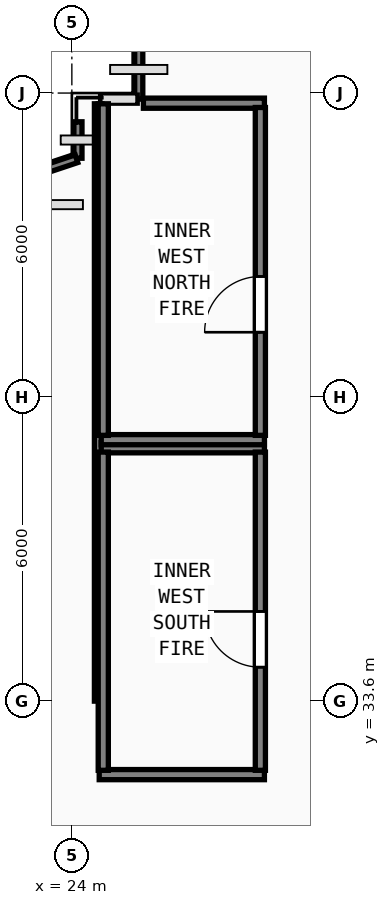
"""IFC4 building model, lengths in metres.
Left out: names, types, materials, properties, quantities, classifications, styles, units other than length and angle.
Written with IfcOpenShell. Run it as: python <this file> out.ifc"""

import sys

from ifc_helpers import new_model, si_unit, direction, frame, frame_2d, origin, origin_2d, place, context, subcontext, project, spatial, rectangle, hollow_rectangle, extrude, element, fill, save


model = new_model("IFC4")
c1 = context("Model", 3, precision=1e-05, world=origin(), true_north=direction((0.0, 1.0)))
c2 = subcontext(c1, "Body", "Model", "MODEL_VIEW")
j1 = project(units=[si_unit("LENGTHUNIT", "METRE"), si_unit("PLANEANGLEUNIT", "RADIAN")], contexts=[c1])
p1 = place(None, origin())
s1 = spatial("IfcSite", under=j1, at=p1, CompositionType="ELEMENT")
p2 = place(p1, origin())
s2 = spatial("IfcBuilding", under=s1, at=p2, CompositionType="ELEMENT")
p3 = place(p2, frame((0.0, 0.0, 89.4)))
s3 = spatial("IfcBuildingStorey", under=s2, at=p3, CompositionType="ELEMENT", Elevation=89.4)
for number, where, z_axis, x_axis in (
    (1, (24.0, 33.6, 0.0), (0.0, 0.0, 1.0), (1.0, 0.0, 0.0)),
    (2, (24.0, 45.6, 0.0), (0.0, 0.0, 1.0), (1.0, 0.0, 0.0)),
):
    element("IfcColumn", number, at=place(p3, frame(where, z_axis=z_axis, x_axis=x_axis)), inside=s3, PredefinedType="COLUMN", context=c2, shape_type="SweptSolid", body=[
        extrude(hollow_rectangle(XDim=1.15, YDim=1.15, WallThickness=0.042, at=origin_2d()), origin(), (0.0, 0.0, 1.0), 4.6),
    ])
p4 = place(p3, frame((24.0, 39.6, 0.0), z_axis=(0.0, 0.0, 1.0), x_axis=(1.0, 0.0, 0.0)))
e3 = element("IfcColumn", 3, at=p4, inside=s3, PredefinedType="COLUMN", context=c2, shape_type="SweptSolid", body=[
    extrude(hollow_rectangle(XDim=1.0, YDim=1.0, WallThickness=0.038, at=origin_2d()), origin(), (0.0, 0.0, 1.0), 4.6),
])
p5 = place(p3, frame((25.32, 46.65, 0.0), z_axis=(0.0, 0.0, 1.0), x_axis=(0.0, -1.0, 0.0)))
e4 = element("IfcWall", 4, at=p5, inside=s3, PredefinedType="PARAPET", context=c2, shape_type="SweptSolid", body=[
    extrude(rectangle(XDim=1.17, YDim=0.16, at=frame_2d((0.585, 0.0))), origin(), (0.0, 0.0, 1.0), 1.15),
])
p6 = place(p3, frame((25.29, 45.48, 0.0), z_axis=(0.0, 0.0, 1.0), x_axis=(-1.0, 0.0, 0.0)))
e5 = element("IfcWall", 5, at=p6, inside=s3, PredefinedType="PARAPET", context=c2, shape_type="SweptSolid", body=[
    extrude(rectangle(XDim=0.723, YDim=0.16, at=frame_2d((0.362, 0.0))), origin(), (0.0, 0.0, 1.0), 1.15),
])
p7 = place(p3, frame((24.12, 45.033, 0.0), z_axis=(0.0, 0.0, 1.0), x_axis=(0.0, -1.0, 0.0)))
e6 = element("IfcWall", 6, at=p7, inside=s3, PredefinedType="PARAPET", context=c2, shape_type="SweptSolid", body=[
    extrude(rectangle(XDim=0.719, YDim=0.16, at=frame_2d((0.36, 0.0))), origin(), (0.0, 0.0, 1.0), 1.15),
])
p8 = place(p3, frame((24.092, 44.304, 0.0), z_axis=(0.0, 0.0, 1.0), x_axis=(-0.948683298051, -0.316227766017, 0.0)))
e7 = element("IfcWall", 7, at=p8, inside=s3, PredefinedType="PARAPET", context=c2, shape_type="SweptSolid", body=[
    extrude(rectangle(XDim=5.73, YDim=0.16, at=frame_2d((2.865, 0.0))), origin(), (0.0, 0.0, 1.0), 1.15),
])
p9 = place(p3, frame((24.52, 33.6, 0.0), z_axis=(0.0, 0.0, 1.0), x_axis=(0.0, 1.0, 0.0)))
e8 = element("IfcWall", 8, at=p9, inside=s3, PredefinedType="PARTITIONING", context=c2, shape_type="SweptSolid", body=[
    extrude(rectangle(XDim=11.788, YDim=0.15, at=frame_2d((5.894, 0.0))), origin(), (0.0, 0.0, 1.0), 4.35),
])
p10 = place(p3, frame((24.58, 38.6, 0.0), z_axis=(0.0, 0.0, 1.0), x_axis=(1.0, 0.0, 0.0)))
e9 = element("IfcWall", 9, at=p10, inside=s3, PredefinedType="SOLIDWALL", context=c2, shape_type="SweptSolid", body=[
    extrude(rectangle(XDim=3.22, YDim=0.2, at=frame_2d((1.61, 0.0))), origin(), (0.0, 0.0, 1.0), 4.35),
])
p11 = place(p3, frame((24.54, 32.15, 0.0), z_axis=(0.0, 0.0, 1.0), x_axis=(1.0, 0.0, 0.0)))
e10 = element("IfcWall", 10, at=p11, inside=s3, PredefinedType="SOLIDWALL", context=c2, shape_type="SweptSolid", body=[
    extrude(rectangle(XDim=3.26, YDim=0.2, at=frame_2d((1.63, 0.0))), origin(), (0.0, 0.0, 1.0), 4.35),
])
p12 = place(p3, frame((24.62, 32.235, 0.0), z_axis=(0.0, 0.0, 1.0), x_axis=(0.0, 1.0, 0.0)))
e11 = element("IfcWall", 11, at=p12, inside=s3, PredefinedType="SOLIDWALL", context=c2, shape_type="SweptSolid", body=[
    extrude(rectangle(XDim=6.28, YDim=0.2, at=frame_2d((3.14, 0.0))), origin(), (0.0, 0.0, 1.0), 4.35),
])
p13 = place(p3, frame((27.72, 32.235, 0.0), z_axis=(0.0, 0.0, 1.0), x_axis=(0.0, 1.0, 0.0)))
e12 = element("IfcWall", 12, at=p13, inside=s3, PredefinedType="SOLIDWALL", context=c2, shape_type="SweptSolid", body=[
    extrude(rectangle(XDim=6.28, YDim=0.2, at=frame_2d((3.14, 0.0))), origin(), (0.0, 0.0, 1.0), 4.35),
])
p14 = place(p13, frame((3.135, 0.0, 0.0), z_axis=(0.0, 0.0, 1.0), x_axis=(-1.0, 0.0, 0.0)))
e13 = element("IfcOpeningElement", 13, at=p14, cuts=e12, PredefinedType="OPENING", context=c2, shape_type="SweptSolid", body=[
    extrude(rectangle(XDim=1.1, YDim=2.15, at=frame_2d((0.55, 1.075))), frame((0.0, 0.11, 0.0), z_axis=(0.0, -1.0, 0.0), x_axis=(1.0, 0.0, 0.0)), (0.0, 0.0, 1.0), 0.22),
])
p15 = place(p3, frame((25.412, 45.4, 0.0), z_axis=(0.0, 0.0, 1.0), x_axis=(1.0, 0.0, 0.0)))
e14 = element("IfcWall", 14, at=p15, inside=s3, PredefinedType="SOLIDWALL", context=c2, shape_type="SweptSolid", body=[
    extrude(rectangle(XDim=2.388, YDim=0.2, at=frame_2d((1.194, 0.0))), origin(), (0.0, 0.0, 1.0), 4.35),
])
p16 = place(p3, frame((24.58, 38.76, 0.0), z_axis=(0.0, 0.0, 1.0), x_axis=(1.0, 0.0, 0.0)))
e15 = element("IfcWall", 15, at=p16, inside=s3, PredefinedType="SOLIDWALL", context=c2, shape_type="SweptSolid", body=[
    extrude(rectangle(XDim=3.22, YDim=0.2, at=frame_2d((1.61, 0.0))), origin(), (0.0, 0.0, 1.0), 4.35),
])
p17 = place(p3, frame((24.62, 38.845, 0.0), z_axis=(0.0, 0.0, 1.0), x_axis=(0.0, 1.0, 0.0)))
e16 = element("IfcWall", 16, at=p17, inside=s3, PredefinedType="SOLIDWALL", context=c2, shape_type="SweptSolid", body=[
    extrude(rectangle(XDim=6.543, YDim=0.2, at=frame_2d((3.271, 0.0))), origin(), (0.0, 0.0, 1.0), 4.35),
])
p18 = place(p3, frame((27.72, 38.845, 0.0), z_axis=(0.0, 0.0, 1.0), x_axis=(0.0, 1.0, 0.0)))
e17 = element("IfcWall", 17, at=p18, inside=s3, PredefinedType="SOLIDWALL", context=c2, shape_type="SweptSolid", body=[
    extrude(rectangle(XDim=6.47, YDim=0.2, at=frame_2d((3.235, 0.0))), origin(), (0.0, 0.0, 1.0), 4.35),
])
p19 = place(p18, frame((3.135, 0.0, 0.0), z_axis=(0.0, 0.0, 1.0), x_axis=(-1.0, 0.0, 0.0)))
e18 = element("IfcOpeningElement", 18, at=p19, cuts=e17, PredefinedType="OPENING", context=c2, shape_type="SweptSolid", body=[
    extrude(rectangle(XDim=1.1, YDim=2.15, at=frame_2d((0.55, 1.075))), frame((0.0, 0.11, 0.0), z_axis=(0.0, -1.0, 0.0), x_axis=(1.0, 0.0, 0.0)), (0.0, 0.0, 1.0), 0.22),
])
p20 = place(p14, origin())
e19 = element("IfcDoor", 19, at=p20, inside=s3, OperationType="SINGLE_SWING_LEFT", PredefinedType="DOOR", context=c2, shape_type="SweptSolid", body=[
    extrude(rectangle(XDim=1.1, YDim=2.15, at=frame_2d((0.55, 1.075))), frame((0.0, 0.025, 0.0), z_axis=(0.0, -1.0, 0.0), x_axis=(1.0, 0.0, 0.0)), (0.0, 0.0, 1.0), 0.05),
])
fill(e13, e19)
p21 = place(p19, origin())
e20 = element("IfcDoor", 20, at=p21, inside=s3, OperationType="SINGLE_SWING_RIGHT", PredefinedType="DOOR", context=c2, shape_type="SweptSolid", body=[
    extrude(rectangle(XDim=1.1, YDim=2.15, at=frame_2d((0.55, 1.075))), frame((0.0, 0.025, 0.0), z_axis=(0.0, -1.0, 0.0), x_axis=(1.0, 0.0, 0.0)), (0.0, 0.0, 1.0), 0.05),
])
fill(e18, e20)
save(model, sys.argv[1])
